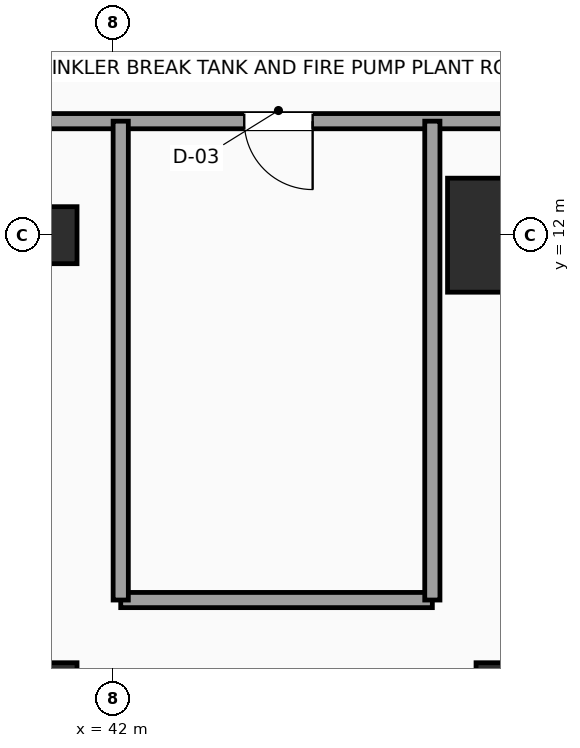
"""IFC4 building model, lengths in metres.
Left out: names, types, materials, properties, quantities, classifications, styles, units other than length and angle.
Written with IfcOpenShell. Run it as: python <this file> out.ifc"""

import sys

from ifc_helpers import new_model, si_unit, direction, frame, frame_2d, origin, origin_2d, place, context, subcontext, project, spatial, rectangle, hollow_rectangle, extrude, element, fill, save


model = new_model("IFC4")
c1 = context("Model", 3, precision=1e-05, world=origin(), true_north=direction((0.0, 1.0)))
c2 = subcontext(c1, "Body", "Model", "MODEL_VIEW")
j1 = project(units=[si_unit("LENGTHUNIT", "METRE"), si_unit("PLANEANGLEUNIT", "RADIAN")], contexts=[c1])
p1 = place(None, origin())
s1 = spatial("IfcSite", under=j1, at=p1, CompositionType="ELEMENT")
p2 = place(p1, origin())
s2 = spatial("IfcBuilding", under=s1, at=p2, CompositionType="ELEMENT")
p3 = place(p2, frame((0.0, 0.0, 27.6)))
s3 = spatial("IfcBuildingStorey", under=s2, at=p3, CompositionType="ELEMENT", Elevation=27.6)
for number, where, z_axis, x_axis in (
    (1, (41.15, 6.0, -0.35), (0.0, 0.0, 1.0), (1.0, 0.0, 0.0)),
    (2, (41.15, 12.0, -0.35), (0.0, 0.0, 1.0), (1.0, 0.0, 0.0)),
    (3, (47.15, 6.0, -0.35), (0.0, 0.0, 1.0), (1.0, 0.0, 0.0)),
):
    element("IfcColumn", number, at=place(p3, frame(where, z_axis=z_axis, x_axis=x_axis)), inside=s3, PredefinedType="COLUMN", context=c2, shape_type="SweptSolid", body=[
        extrude(hollow_rectangle(XDim=0.75, YDim=0.75, WallThickness=0.035, InnerFilletRadius=0.035, OuterFilletRadius=0.05, at=origin_2d()), origin(), (0.0, 0.0, 1.0), 5.15),
    ])
p4 = place(p3, frame((47.15, 12.0, -0.35), z_axis=(0.0, 0.0, 1.0), x_axis=(1.0, 0.0, 0.0)))
e4 = element("IfcColumn", 4, at=p4, inside=s3, PredefinedType="COLUMN", context=c2, shape_type="SweptSolid", body=[
    extrude(rectangle(XDim=1.5, YDim=1.5, at=origin_2d()), origin(), (0.0, 0.0, 1.0), 5.15),
])
p5 = place(p3, frame((53.7, 13.5, 0.0), z_axis=(0.0, 0.0, 1.0), x_axis=(-1.0, 0.0, 0.0)))
e5 = element("IfcWall", 5, at=p5, inside=s3, PredefinedType="SOLIDWALL", context=c2, shape_type="SweptSolid", body=[
    extrude(rectangle(XDim=15.15, YDim=0.2, at=frame_2d((7.575, 0.0))), origin(), (0.0, 0.0, 1.0), 4.55),
])
p6 = place(p5, frame((9.075, 0.0, 0.0)))
e6 = element("IfcOpeningElement", 6, at=p6, cuts=e5, PredefinedType="OPENING", context=c2, shape_type="SweptSolid", body=[
    extrude(rectangle(XDim=0.9, YDim=2.15, at=frame_2d((0.45, 1.075))), frame((0.0, 0.11, 0.0), z_axis=(0.0, -1.0, 0.0), x_axis=(1.0, 0.0, 0.0)), (0.0, 0.0, 1.0), 0.22),
])
p7 = place(p3, frame((42.1, 7.2, 0.0), z_axis=(0.0, 0.0, 1.0), x_axis=(1.0, 0.0, 0.0)))
e7 = element("IfcWall", 7, at=p7, inside=s3, PredefinedType="SOLIDWALL", context=c2, shape_type="SweptSolid", body=[
    extrude(rectangle(XDim=4.1, YDim=0.2, at=frame_2d((2.05, 0.0))), origin(), (0.0, 0.0, 1.0), 4.55),
])
for number, where, z_axis, x_axis in (
    (8, (42.1, 7.2, 0.0), (0.0, 0.0, 1.0), (0.0, 1.0, 0.0)),
    (9, (46.2, 7.2, 0.0), (0.0, 0.0, 1.0), (0.0, 1.0, 0.0)),
):
    element("IfcWall", number, at=place(p3, frame(where, z_axis=z_axis, x_axis=x_axis)), inside=s3, PredefinedType="SOLIDWALL", context=c2, shape_type="SweptSolid", body=[
        extrude(rectangle(XDim=6.3, YDim=0.2, at=frame_2d((3.15, 0.0))), origin(), (0.0, 0.0, 1.0), 4.55),
    ])
p8 = place(p6, origin())
e10 = element("IfcDoor", 10, at=p8, inside=s3, OperationType="SINGLE_SWING_LEFT", PredefinedType="DOOR", context=c2, shape_type="SweptSolid", body=[
    extrude(rectangle(XDim=0.9, YDim=2.15, at=frame_2d((0.45, 1.075))), frame((0.0, 0.025, 0.0), z_axis=(0.0, -1.0, 0.0), x_axis=(1.0, 0.0, 0.0)), (0.0, 0.0, 1.0), 0.05),
])
fill(e6, e10)
save(model, sys.argv[1])
